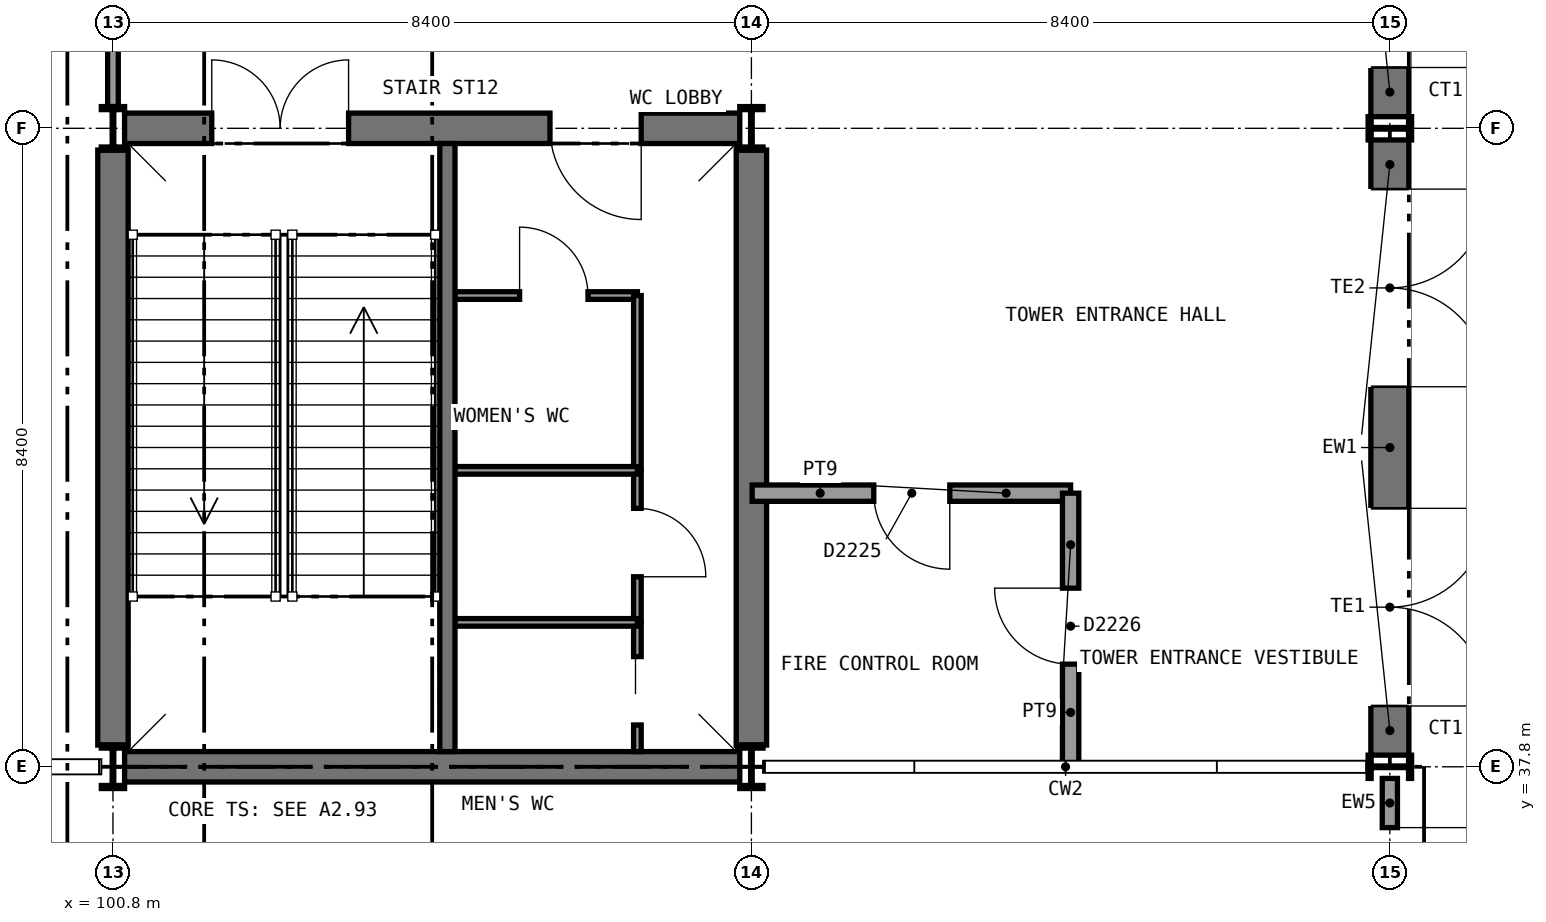
"""IFC4 building model, lengths in metres.
Left out: names, types, materials, properties, quantities, classifications, styles, units other than length and angle.
Written with IfcOpenShell. Run it as: python <this file> out.ifc"""

import sys

from ifc_helpers import new_model, si_unit, direction, frame, frame_2d, origin, origin_2d, place, context, subcontext, project, spatial, rectangle, i_section, extrude, element, fill, save


model = new_model("IFC4")
c1 = context("Model", 3, precision=1e-05, world=origin(), true_north=direction((0.0, 1.0)))
c2 = subcontext(c1, "Body", "Model", "MODEL_VIEW")
j1 = project(units=[si_unit("LENGTHUNIT", "METRE"), si_unit("PLANEANGLEUNIT", "RADIAN")], contexts=[c1])
p1 = place(None, origin())
s1 = spatial("IfcSite", under=j1, at=p1, CompositionType="ELEMENT")
p2 = place(p1, origin())
s2 = spatial("IfcBuilding", under=s1, at=p2, CompositionType="ELEMENT")
p3 = place(p2, origin())
s3 = spatial("IfcBuildingStorey", under=s2, at=p3, CompositionType="ELEMENT", Elevation=0.0)
p4 = place(p3, frame((100.953, 37.8, 0.0), z_axis=(0.0, 0.0, 1.0), x_axis=(1.0, 0.0, 0.0)))
e1 = element("IfcWall", 1, at=p4, inside=s3, PredefinedType="SHEAR", context=c2, shape_type="SweptSolid", body=[
    extrude(rectangle(XDim=8.094, YDim=0.4, at=frame_2d((4.047, 0.0))), origin(), (0.0, 0.0, 1.0), 5.85),
])
p5 = place(p3, frame((100.953, 46.2, 0.0), z_axis=(0.0, 0.0, 1.0), x_axis=(1.0, 0.0, 0.0)))
e2 = element("IfcWall", 2, at=p5, inside=s3, PredefinedType="SHEAR", context=c2, shape_type="SweptSolid", body=[
    extrude(rectangle(XDim=8.094, YDim=0.4, at=frame_2d((4.047, 0.0))), origin(), (0.0, 0.0, 1.0), 5.85),
])
p6 = place(p5, frame((5.597, 0.0, 0.0)))
e3 = element("IfcOpeningElement", 3, at=p6, cuts=e2, PredefinedType="OPENING", context=c2, shape_type="SweptSolid", body=[
    extrude(rectangle(XDim=1.2, YDim=2.1, at=frame_2d((0.6, 1.05))), frame((0.0, 0.21, 0.0), z_axis=(0.0, -1.0, 0.0), x_axis=(1.0, 0.0, 0.0)), (0.0, 0.0, 1.0), 0.42),
])
p7 = place(p5, frame((1.147, 0.0, 0.0)))
e4 = element("IfcOpeningElement", 4, at=p7, cuts=e2, PredefinedType="OPENING", context=c2, shape_type="SweptSolid", body=[
    extrude(rectangle(XDim=1.8, YDim=2.1, at=frame_2d((0.9, 1.05))), frame((0.0, 0.21, 0.0), z_axis=(0.0, -1.0, 0.0), x_axis=(1.0, 0.0, 0.0)), (0.0, 0.0, 1.0), 0.42),
])
for number, where, z_axis, x_axis in (
    (5, (100.8, 38.086, 0.0), (0.0, 0.0, 1.0), (0.0, 1.0, 0.0)),
    (6, (109.2, 38.086, 0.0), (0.0, 0.0, 1.0), (0.0, 1.0, 0.0)),
):
    element("IfcWall", number, at=place(p3, frame(where, z_axis=z_axis, x_axis=x_axis)), inside=s3, PredefinedType="SHEAR", context=c2, shape_type="SweptSolid", body=[
        extrude(rectangle(XDim=7.828, YDim=0.4, at=frame_2d((3.914, 0.0))), origin(), (0.0, 0.0, 1.0), 5.85),
    ])
for number, where, z_axis, x_axis in (
    (7, (100.8, 37.8, 0.0), (0.0, 0.0, 1.0), (1.0, 0.0, 0.0)),
    (8, (100.8, 46.2, 0.0), (0.0, 0.0, 1.0), (1.0, 0.0, 0.0)),
    (9, (109.2, 37.8, 0.0), (0.0, 0.0, 1.0), (1.0, 0.0, 0.0)),
    (10, (109.2, 46.2, 0.0), (0.0, 0.0, 1.0), (1.0, 0.0, 0.0)),
    (11, (117.6, 37.8, 0.0), (0.0, 0.0, 1.0), (0.0, 1.0, 0.0)),
    (12, (117.6, 46.2, 0.0), (0.0, 0.0, 1.0), (0.0, 1.0, 0.0)),
):
    element("IfcColumn", number, at=place(p3, frame(where, z_axis=z_axis, x_axis=x_axis)), inside=s3, PredefinedType="COLUMN", context=c2, shape_type="SweptSolid", body=[
        extrude(i_section(OverallWidth=0.306, OverallDepth=0.572, WebThickness=0.021, FlangeThickness=0.04, FilletRadius=0.027, at=origin_2d()), origin(), (0.0, 0.0, 1.0), 6.0),
    ])
p8 = place(p3, frame((105.3, 44.0, 0.0), z_axis=(0.0, 0.0, 1.0), x_axis=(1.0, 0.0, 0.0)))
e13 = element("IfcWall", 13, at=p8, inside=s3, PredefinedType="PARTITIONING", context=c2, shape_type="SweptSolid", body=[
    extrude(rectangle(XDim=2.4, YDim=0.1, at=frame_2d((1.2, 0.0))), origin(), (0.0, 0.0, 1.0), 5.78),
])
p9 = place(p8, frame((0.85, 0.0, 0.0)))
e14 = element("IfcOpeningElement", 14, at=p9, cuts=e13, PredefinedType="OPENING", context=c2, shape_type="SweptSolid", body=[
    extrude(rectangle(XDim=0.9, YDim=2.1, at=frame_2d((0.45, 1.05))), frame((0.0, 0.06, 0.0), z_axis=(0.0, -1.0, 0.0), x_axis=(1.0, 0.0, 0.0)), (0.0, 0.0, 1.0), 0.12),
])
p10 = place(p3, frame((107.7, 41.7, 0.0), z_axis=(0.0, 0.0, 1.0), x_axis=(0.0, 1.0, 0.0)))
e15 = element("IfcWall", 15, at=p10, inside=s3, PredefinedType="PARTITIONING", context=c2, shape_type="SweptSolid", body=[
    extrude(rectangle(XDim=2.3, YDim=0.1, at=frame_2d((1.15, 0.0))), origin(), (0.0, 0.0, 1.0), 5.78),
])
p11 = place(p3, frame((107.7, 39.7, 0.0), z_axis=(0.0, 0.0, 1.0), x_axis=(0.0, 1.0, 0.0)))
e16 = element("IfcWall", 16, at=p11, inside=s3, PredefinedType="PARTITIONING", context=c2, shape_type="SweptSolid", body=[
    extrude(rectangle(XDim=2.0, YDim=0.1, at=frame_2d((1.0, 0.0))), origin(), (0.0, 0.0, 1.0), 5.78),
])
p12 = place(p11, frame((0.6, 0.0, 0.0)))
e17 = element("IfcOpeningElement", 17, at=p12, cuts=e16, PredefinedType="OPENING", context=c2, shape_type="SweptSolid", body=[
    extrude(rectangle(XDim=0.9, YDim=2.1, at=frame_2d((0.45, 1.05))), frame((0.0, 0.06, 0.0), z_axis=(0.0, -1.0, 0.0), x_axis=(1.0, 0.0, 0.0)), (0.0, 0.0, 1.0), 0.12),
])
p13 = place(p3, frame((107.7, 38.0, 0.0), z_axis=(0.0, 0.0, 1.0), x_axis=(0.0, 1.0, 0.0)))
e18 = element("IfcWall", 18, at=p13, inside=s3, PredefinedType="PARTITIONING", context=c2, shape_type="SweptSolid", body=[
    extrude(rectangle(XDim=1.7, YDim=0.1, at=frame_2d((0.85, 0.0))), origin(), (0.0, 0.0, 1.0), 5.78),
])
p14 = place(p13, frame((0.35, 0.0, 0.0)))
e19 = element("IfcOpeningElement", 19, at=p14, cuts=e18, PredefinedType="OPENING", context=c2, shape_type="SweptSolid", body=[
    extrude(rectangle(XDim=0.9, YDim=2.1, at=frame_2d((0.45, 1.05))), frame((0.0, 0.06, 0.0), z_axis=(0.0, -1.0, 0.0), x_axis=(1.0, 0.0, 0.0)), (0.0, 0.0, 1.0), 0.12),
])
for number, where, z_axis, x_axis in (
    (20, (105.3, 41.7, 0.0), (0.0, 0.0, 1.0), (1.0, 0.0, 0.0)),
    (21, (105.3, 39.7, 0.0), (0.0, 0.0, 1.0), (1.0, 0.0, 0.0)),
):
    element("IfcWall", number, at=place(p3, frame(where, z_axis=z_axis, x_axis=x_axis)), inside=s3, PredefinedType="PARTITIONING", context=c2, shape_type="SweptSolid", body=[
        extrude(rectangle(XDim=2.4, YDim=0.1, at=frame_2d((1.2, 0.0))), origin(), (0.0, 0.0, 1.0), 5.78),
    ])
p15 = place(p3, frame((100.8, 46.486, 0.0), z_axis=(0.0, 0.0, 1.0), x_axis=(0.0, 1.0, 0.0)))
e22 = element("IfcWall", 22, at=p15, inside=s3, PredefinedType="PARTITIONING", context=c2, shape_type="SweptSolid", body=[
    extrude(rectangle(XDim=3.1, YDim=0.14, at=frame_2d((1.55, 0.0))), origin(), (0.0, 0.0, 1.0), 5.41),
])
p16 = place(p3, frame((109.21, 41.4, 0.0), z_axis=(0.0, 0.0, 1.0), x_axis=(1.0, 0.0, 0.0)))
e23 = element("IfcWall", 23, at=p16, inside=s3, PredefinedType="SOLIDWALL", context=c2, shape_type="SweptSolid", body=[
    extrude(rectangle(XDim=4.19, YDim=0.215, at=frame_2d((2.095, 0.0))), origin(), (0.0, 0.0, 1.0), 5.85),
])
p17 = place(p16, frame((1.6, 0.0, 0.0)))
e24 = element("IfcOpeningElement", 24, at=p17, cuts=e23, PredefinedType="OPENING", context=c2, shape_type="SweptSolid", body=[
    extrude(rectangle(XDim=1.0, YDim=2.1, at=frame_2d((0.5, 1.05))), frame((0.0, 0.118, 0.0), z_axis=(0.0, -1.0, 0.0), x_axis=(1.0, 0.0, 0.0)), (0.0, 0.0, 1.0), 0.235),
])
p18 = place(p3, frame((113.4, 37.8, 0.0), z_axis=(0.0, 0.0, 1.0), x_axis=(0.0, 1.0, 0.0)))
e25 = element("IfcWall", 25, at=p18, inside=s3, PredefinedType="SOLIDWALL", context=c2, shape_type="SweptSolid", body=[
    extrude(rectangle(XDim=3.6, YDim=0.215, at=frame_2d((1.8, 0.0))), origin(), (0.0, 0.0, 1.0), 5.85),
])
p19 = place(p18, frame((1.35, 0.0, 0.0)))
e26 = element("IfcOpeningElement", 26, at=p19, cuts=e25, PredefinedType="OPENING", context=c2, shape_type="SweptSolid", body=[
    extrude(rectangle(XDim=1.0, YDim=2.1, at=frame_2d((0.5, 1.05))), frame((0.0, 0.118, 0.0), z_axis=(0.0, -1.0, 0.0), x_axis=(1.0, 0.0, 0.0)), (0.0, 0.0, 1.0), 0.235),
])
p20 = place(p3, frame((117.6, 25.353, 0.0), z_axis=(0.0, 0.0, 1.0), x_axis=(0.0, 1.0, 0.0)))
e27 = element("IfcWall", 27, at=p20, inside=s3, PredefinedType="STANDARD", context=c2, shape_type="SweptSolid", body=[
    extrude(rectangle(XDim=12.294, YDim=0.2, at=frame_2d((6.147, 0.0))), origin(), (0.0, 0.0, 1.0), 6.0),
])
p21 = place(p20, frame((0.647, 0.0, 0.0)))
e28 = element("IfcOpeningElement", 28, at=p21, cuts=e27, PredefinedType="OPENING", context=c2, shape_type="SweptSolid", body=[
    extrude(rectangle(XDim=2.6, YDim=3.0, at=frame_2d((1.3, 1.5))), frame((0.0, 0.11, 0.0), z_axis=(0.0, -1.0, 0.0), x_axis=(1.0, 0.0, 0.0)), (0.0, 0.0, 1.0), 0.22),
])
p22 = place(p20, frame((4.847, 0.0, 0.0)))
e29 = element("IfcOpeningElement", 29, at=p22, cuts=e27, PredefinedType="OPENING", context=c2, shape_type="SweptSolid", body=[
    extrude(rectangle(XDim=2.6, YDim=3.0, at=frame_2d((1.3, 1.5))), frame((0.0, 0.11, 0.0), z_axis=(0.0, -1.0, 0.0), x_axis=(1.0, 0.0, 0.0)), (0.0, 0.0, 1.0), 0.22),
])
p23 = place(p20, frame((9.047, 0.0, 0.0)))
e30 = element("IfcOpeningElement", 30, at=p23, cuts=e27, PredefinedType="OPENING", context=c2, shape_type="SweptSolid", body=[
    extrude(rectangle(XDim=2.6, YDim=3.0, at=frame_2d((1.3, 1.5))), frame((0.0, 0.11, 0.0), z_axis=(0.0, -1.0, 0.0), x_axis=(1.0, 0.0, 0.0)), (0.0, 0.0, 1.0), 0.22),
])
p24 = place(p3, frame((117.6, 37.953, 0.0), z_axis=(0.0, 0.0, 1.0), x_axis=(0.0, 1.0, 0.0)))
e31 = element("IfcWall", 31, at=p24, inside=s3, PredefinedType="STANDARD", context=c2, shape_type="SweptSolid", body=[
    extrude(rectangle(XDim=8.094, YDim=0.5, at=frame_2d((4.047, 0.0))), origin(), (0.0, 0.0, 1.0), 5.85),
])
p25 = place(p24, frame((0.647, 0.0, 0.0)))
e32 = element("IfcOpeningElement", 32, at=p25, cuts=e31, PredefinedType="OPENING", context=c2, shape_type="SweptSolid", body=[
    extrude(rectangle(XDim=2.6, YDim=3.3, at=frame_2d((1.3, 1.65))), frame((0.0, 0.26, 0.0), z_axis=(0.0, -1.0, 0.0), x_axis=(1.0, 0.0, 0.0)), (0.0, 0.0, 1.0), 0.52),
])
p26 = place(p24, frame((4.847, 0.0, 0.0)))
e33 = element("IfcOpeningElement", 33, at=p26, cuts=e31, PredefinedType="OPENING", context=c2, shape_type="SweptSolid", body=[
    extrude(rectangle(XDim=2.6, YDim=3.3, at=frame_2d((1.3, 1.65))), frame((0.0, 0.26, 0.0), z_axis=(0.0, -1.0, 0.0), x_axis=(1.0, 0.0, 0.0)), (0.0, 0.0, 1.0), 0.52),
])
p27 = place(p3, frame((117.6, 46.353, 0.0), z_axis=(0.0, 0.0, 1.0), x_axis=(0.0, 1.0, 0.0)))
e34 = element("IfcWall", 34, at=p27, inside=s3, PredefinedType="STANDARD", context=c2, shape_type="SweptSolid", body=[
    extrude(rectangle(XDim=8.094, YDim=0.5, at=frame_2d((4.047, 0.0))), origin(), (0.0, 0.0, 1.0), 5.85),
])
p28 = place(p27, frame((0.647, 0.0, 0.0)))
e35 = element("IfcOpeningElement", 35, at=p28, cuts=e34, PredefinedType="OPENING", context=c2, shape_type="SweptSolid", body=[
    extrude(rectangle(XDim=2.6, YDim=3.3, at=frame_2d((1.3, 1.65))), frame((0.0, 0.26, 0.0), z_axis=(0.0, -1.0, 0.0), x_axis=(1.0, 0.0, 0.0)), (0.0, 0.0, 1.0), 0.52),
])
p29 = place(p27, frame((4.847, 0.0, 0.0)))
e36 = element("IfcOpeningElement", 36, at=p29, cuts=e34, PredefinedType="OPENING", context=c2, shape_type="SweptSolid", body=[
    extrude(rectangle(XDim=2.6, YDim=3.3, at=frame_2d((1.3, 1.65))), frame((0.0, 0.26, 0.0), z_axis=(0.0, -1.0, 0.0), x_axis=(1.0, 0.0, 0.0)), (0.0, 0.0, 1.0), 0.52),
])
p30 = place(p3, frame((105.2, 38.0, 0.0), z_axis=(0.0, 0.0, 1.0), x_axis=(0.0, 1.0, 0.0)))
e37 = element("IfcWall", 37, at=p30, inside=s3, PredefinedType="SHEAR", context=c2, shape_type="SweptSolid", body=[
    extrude(rectangle(XDim=8.0, YDim=0.2, at=frame_2d((4.0, 0.0))), origin(), (0.0, 0.0, 1.0), 5.85),
])
p31 = place(p9, origin())
e38 = element("IfcDoor", 38, at=p31, inside=s3, OperationType="SINGLE_SWING_LEFT", PredefinedType="DOOR", context=c2, shape_type="SweptSolid", body=[
    extrude(rectangle(XDim=0.9, YDim=2.1, at=frame_2d((0.45, 1.05))), frame((0.0, 0.025, 0.0), z_axis=(0.0, -1.0, 0.0), x_axis=(1.0, 0.0, 0.0)), (0.0, 0.0, 1.0), 0.05),
])
fill(e14, e38)
p32 = place(p12, frame((0.9, 0.0, 0.0), z_axis=(0.0, 0.0, 1.0), x_axis=(-1.0, 0.0, 0.0)))
e39 = element("IfcDoor", 39, at=p32, inside=s3, OperationType="SINGLE_SWING_RIGHT", PredefinedType="DOOR", context=c2, shape_type="SweptSolid", body=[
    extrude(rectangle(XDim=0.9, YDim=2.1, at=frame_2d((0.45, 1.05))), frame((0.0, 0.025, 0.0), z_axis=(0.0, -1.0, 0.0), x_axis=(1.0, 0.0, 0.0)), (0.0, 0.0, 1.0), 0.05),
])
fill(e17, e39)
p33 = place(p14, origin())
e40 = element("IfcDoor", 40, at=p33, inside=s3, OperationType="SLIDING_TO_RIGHT", PredefinedType="DOOR", context=c2, shape_type="SweptSolid", body=[
    extrude(rectangle(XDim=0.9, YDim=2.1, at=frame_2d((0.45, 1.05))), frame((0.0, 0.025, 0.0), z_axis=(0.0, -1.0, 0.0), x_axis=(1.0, 0.0, 0.0)), (0.0, 0.0, 1.0), 0.05),
])
fill(e19, e40)
p34 = place(p17, frame((1.0, 0.0, 0.0), z_axis=(0.0, 0.0, 1.0), x_axis=(-1.0, 0.0, 0.0)))
e41 = element("IfcDoor", 41, at=p34, inside=s3, OperationType="SINGLE_SWING_LEFT", PredefinedType="DOOR", context=c2, shape_type="SweptSolid", body=[
    extrude(rectangle(XDim=1.0, YDim=2.1, at=frame_2d((0.5, 1.05))), frame((0.0, 0.025, 0.0), z_axis=(0.0, -1.0, 0.0), x_axis=(1.0, 0.0, 0.0)), (0.0, 0.0, 1.0), 0.05),
])
fill(e24, e41)
p35 = place(p19, origin())
e42 = element("IfcDoor", 42, at=p35, inside=s3, OperationType="SINGLE_SWING_RIGHT", PredefinedType="DOOR", context=c2, shape_type="SweptSolid", body=[
    extrude(rectangle(XDim=1.0, YDim=2.1, at=frame_2d((0.5, 1.05))), frame((0.0, 0.025, 0.0), z_axis=(0.0, -1.0, 0.0), x_axis=(1.0, 0.0, 0.0)), (0.0, 0.0, 1.0), 0.05),
])
fill(e26, e42)
p36 = place(p23, frame((2.6, 0.0, 0.0), z_axis=(0.0, 0.0, 1.0), x_axis=(-1.0, 0.0, 0.0)))
e43 = element("IfcDoor", 43, at=p36, inside=s3, OperationType="DOUBLE_DOOR_SINGLE_SWING", PredefinedType="DOOR", context=c2, shape_type="SweptSolid", body=[
    extrude(rectangle(XDim=2.6, YDim=3.0, at=frame_2d((1.3, 1.5))), frame((0.0, 0.025, 0.0), z_axis=(0.0, -1.0, 0.0), x_axis=(1.0, 0.0, 0.0)), (0.0, 0.0, 1.0), 0.05),
])
fill(e30, e43)
p37 = place(p25, frame((2.6, 0.0, 0.0), z_axis=(0.0, 0.0, 1.0), x_axis=(-1.0, 0.0, 0.0)))
e44 = element("IfcDoor", 44, at=p37, inside=s3, OperationType="DOUBLE_DOOR_SINGLE_SWING", PredefinedType="DOOR", context=c2, shape_type="SweptSolid", body=[
    extrude(rectangle(XDim=2.6, YDim=3.3, at=frame_2d((1.3, 1.65))), frame((0.0, 0.025, 0.0), z_axis=(0.0, -1.0, 0.0), x_axis=(1.0, 0.0, 0.0)), (0.0, 0.0, 1.0), 0.05),
])
fill(e32, e44)
p38 = place(p26, frame((2.6, 0.0, 0.0), z_axis=(0.0, 0.0, 1.0), x_axis=(-1.0, 0.0, 0.0)))
e45 = element("IfcDoor", 45, at=p38, inside=s3, OperationType="DOUBLE_DOOR_SINGLE_SWING", PredefinedType="DOOR", context=c2, shape_type="SweptSolid", body=[
    extrude(rectangle(XDim=2.6, YDim=3.3, at=frame_2d((1.3, 1.65))), frame((0.0, 0.025, 0.0), z_axis=(0.0, -1.0, 0.0), x_axis=(1.0, 0.0, 0.0)), (0.0, 0.0, 1.0), 0.05),
])
fill(e33, e45)
p39 = place(p28, frame((2.6, 0.0, 0.0), z_axis=(0.0, 0.0, 1.0), x_axis=(-1.0, 0.0, 0.0)))
e46 = element("IfcDoor", 46, at=p39, inside=s3, OperationType="DOUBLE_DOOR_SINGLE_SWING", PredefinedType="DOOR", context=c2, shape_type="SweptSolid", body=[
    extrude(rectangle(XDim=2.6, YDim=3.3, at=frame_2d((1.3, 1.65))), frame((0.0, 0.025, 0.0), z_axis=(0.0, -1.0, 0.0), x_axis=(1.0, 0.0, 0.0)), (0.0, 0.0, 1.0), 0.05),
])
fill(e35, e46)
p40 = place(p6, frame((1.2, 0.0, 0.0), z_axis=(0.0, 0.0, 1.0), x_axis=(-1.0, 0.0, 0.0)))
e47 = element("IfcDoor", 47, at=p40, inside=s3, OperationType="SINGLE_SWING_LEFT", PredefinedType="DOOR", context=c2, shape_type="SweptSolid", body=[
    extrude(rectangle(XDim=1.2, YDim=2.1, at=frame_2d((0.6, 1.05))), frame((0.0, 0.025, 0.0), z_axis=(0.0, -1.0, 0.0), x_axis=(1.0, 0.0, 0.0)), (0.0, 0.0, 1.0), 0.05),
])
fill(e3, e47)
p41 = place(p7, origin())
e48 = element("IfcDoor", 48, at=p41, inside=s3, OperationType="DOUBLE_DOOR_SINGLE_SWING", PredefinedType="DOOR", context=c2, shape_type="SweptSolid", body=[
    extrude(rectangle(XDim=1.8, YDim=2.1, at=frame_2d((0.9, 1.05))), frame((0.0, 0.025, 0.0), z_axis=(0.0, -1.0, 0.0), x_axis=(1.0, 0.0, 0.0)), (0.0, 0.0, 1.0), 0.05),
])
fill(e4, e48)
save(model, sys.argv[1])
